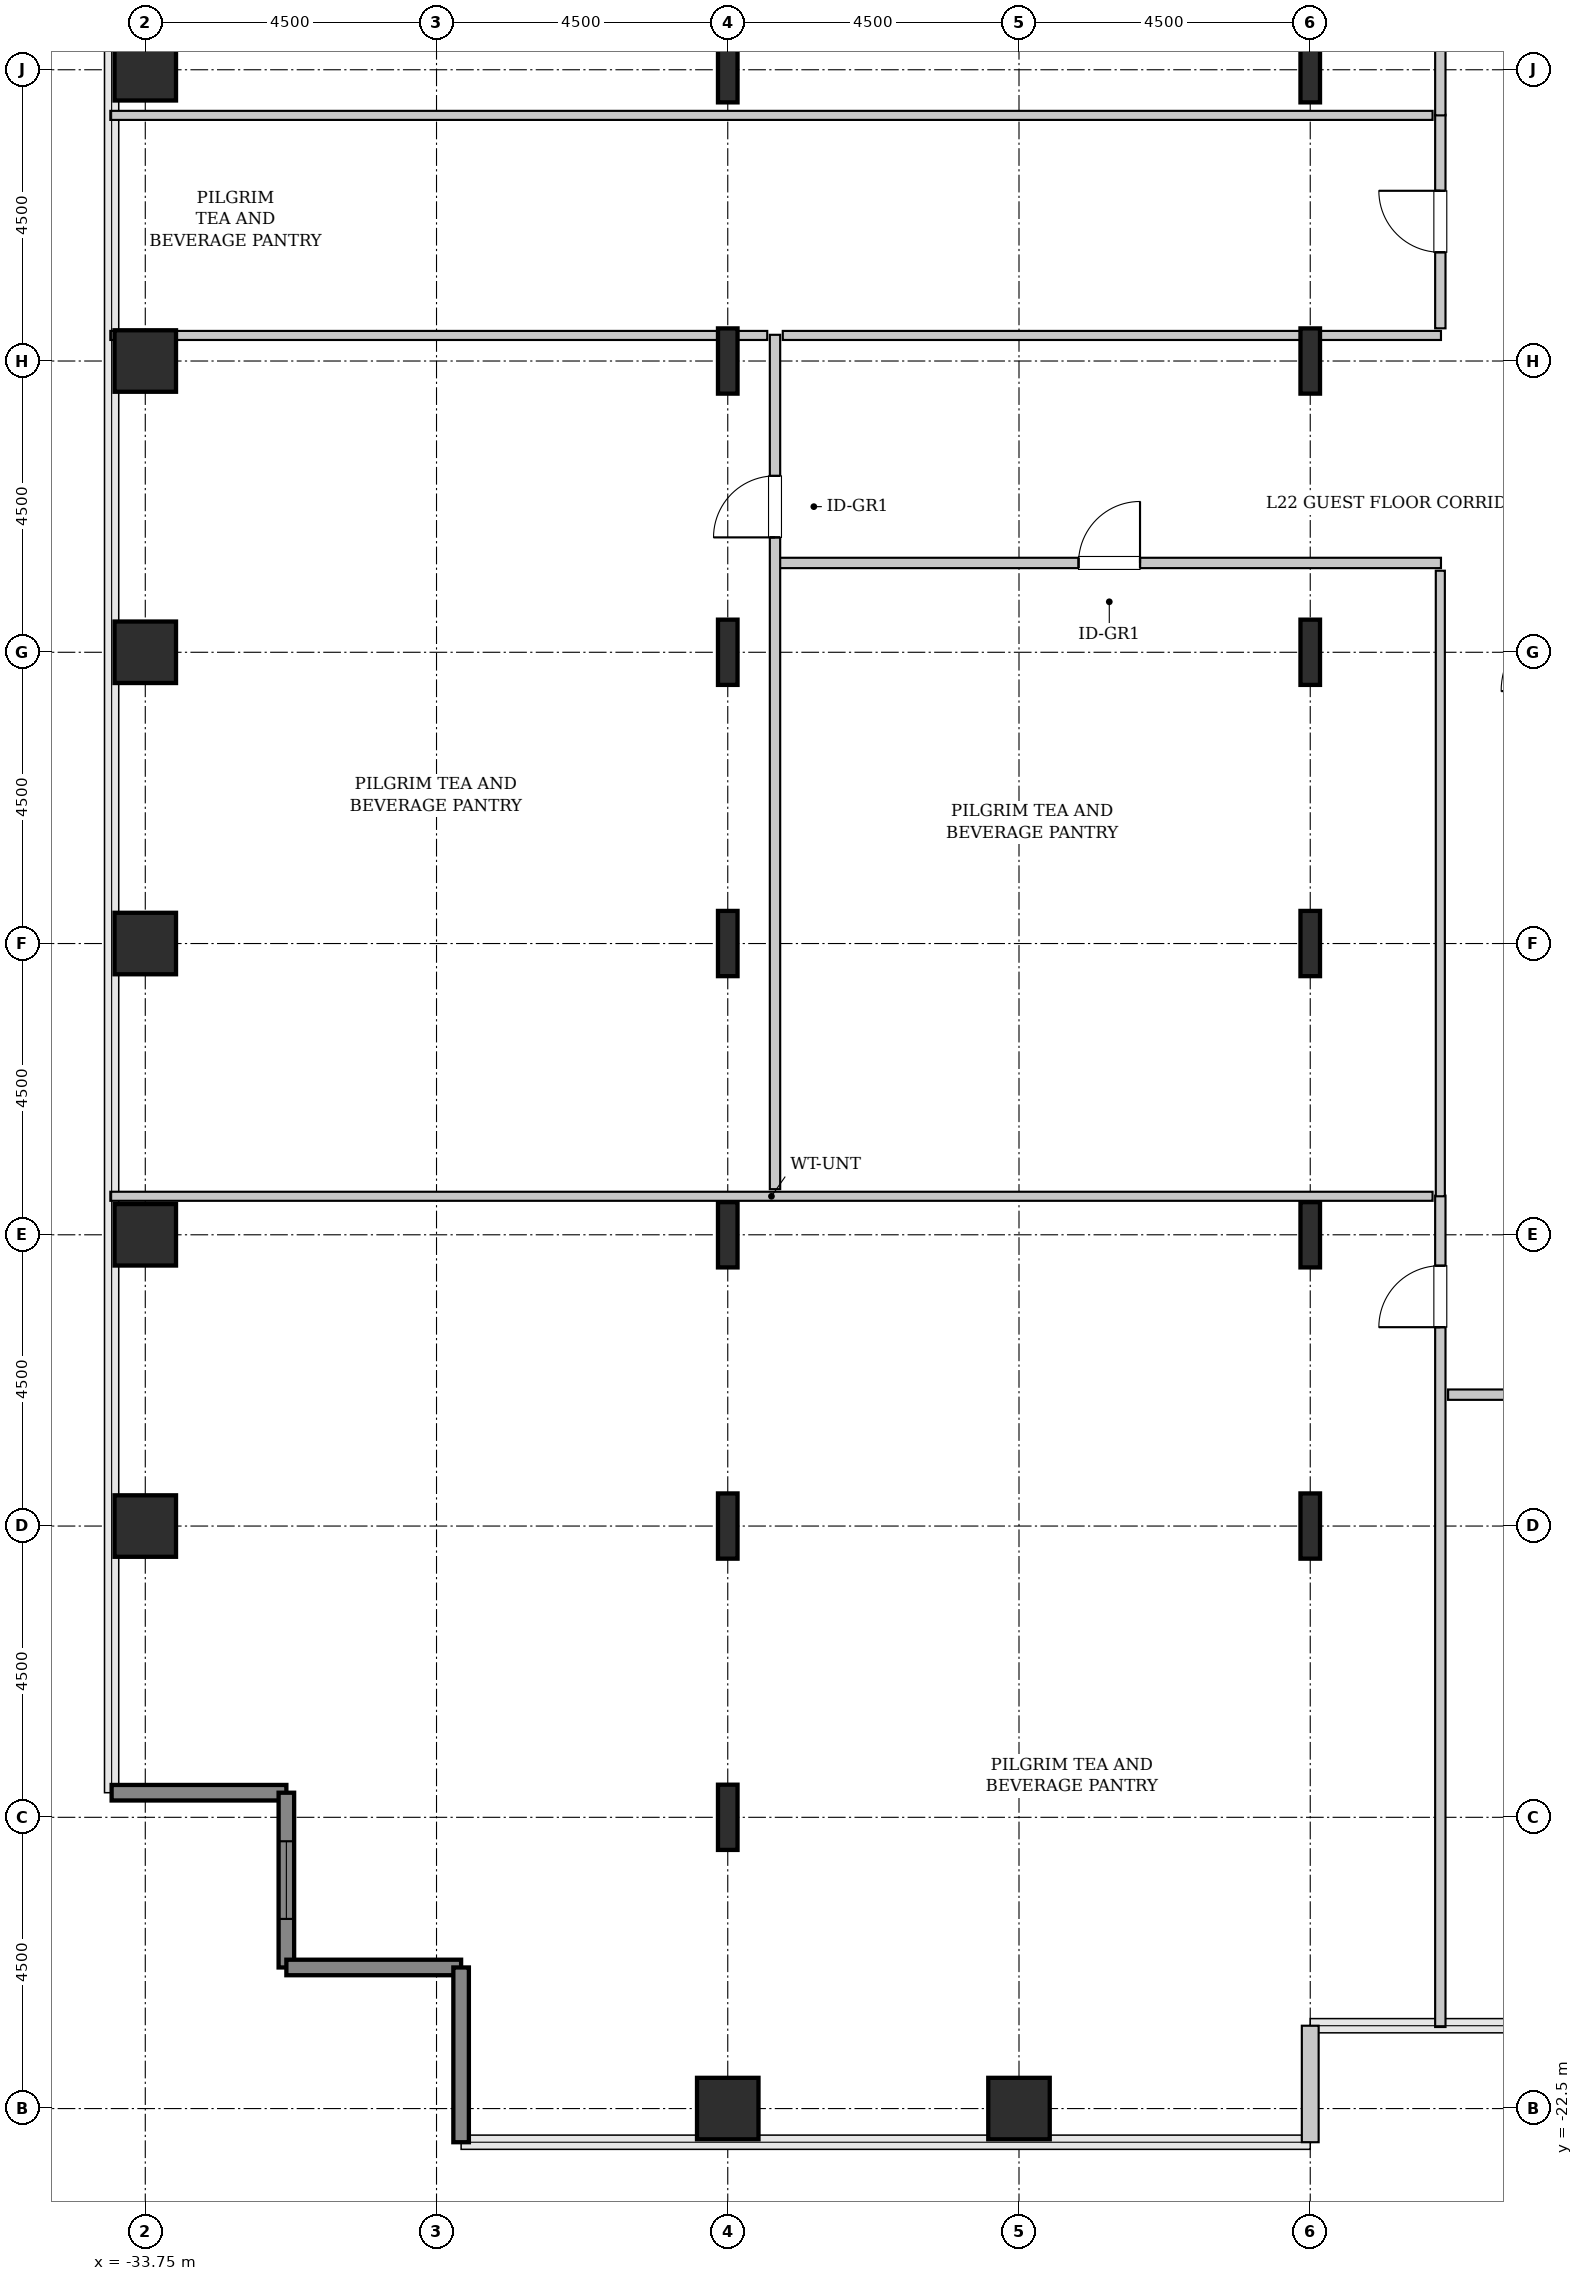
"""IFC4 building model, lengths in metres.
Left out: names, types, materials, properties, quantities, classifications, styles, units other than length and angle.
Written with IfcOpenShell. Run it as: python <this file> out.ifc"""

import sys

from ifc_helpers import new_model, si_unit, direction, frame, frame_2d, origin, origin_2d, place, context, subcontext, project, spatial, rectangle, hollow_rectangle, i_section, extrude, source, transform, mapped, element, fill, save


model = new_model("IFC4")
c1 = context("Model", 3, precision=1e-05, world=origin(), true_north=direction((0.0, 1.0)))
c2 = subcontext(c1, "Body", "Model", "MODEL_VIEW")
j1 = project(units=[si_unit("LENGTHUNIT", "METRE"), si_unit("PLANEANGLEUNIT", "RADIAN")], contexts=[c1])
p1 = place(None, origin())
s1 = spatial("IfcSite", under=j1, at=p1, CompositionType="ELEMENT")
p2 = place(p1, origin())
s2 = spatial("IfcBuilding", under=s1, at=p2, CompositionType="ELEMENT")
p3 = place(p2, frame((0.0, 0.0, 94.6)))
s3 = spatial("IfcBuildingStorey", under=s2, at=p3, CompositionType="ELEMENT", Elevation=94.6)
m1 = source(origin(), c2, "Body", "SweptSolid", [
    extrude(hollow_rectangle(XDim=0.95, YDim=0.95, WallThickness=0.045, InnerFilletRadius=0.045, OuterFilletRadius=0.09, at=origin_2d()), origin(), (0.0, 0.0, 1.0), 3.8),
])
for number, where, z_axis, x_axis in (
    (1, (-33.75, -13.5, 0.0), (0.0, 0.0, 1.0), (1.0, 0.0, 0.0)),
    (2, (-33.75, -9.0, 0.0), (0.0, 0.0, 1.0), (1.0, 0.0, 0.0)),
    (3, (-33.75, -4.5, 0.0), (0.0, 0.0, 1.0), (1.0, 0.0, 0.0)),
    (4, (-33.75, 0.0, 0.0), (0.0, 0.0, 1.0), (1.0, 0.0, 0.0)),
    (5, (-33.75, 4.5, 0.0), (0.0, 0.0, 1.0), (1.0, 0.0, 0.0)),
    (6, (-33.75, 9.0, 0.0), (0.0, 0.0, 1.0), (1.0, 0.0, 0.0)),
    (7, (-24.75, -22.5, 0.0), (0.0, 0.0, 1.0), (1.0, 0.0, 0.0)),
):
    element("IfcColumn", number, at=place(p3, frame(where, z_axis=z_axis, x_axis=x_axis)), inside=s3, PredefinedType="COLUMN", context=c2, shape_type="MappedRepresentation", body=[
        mapped(m1, transform((0.0, 0.0, 0.0), x_axis=(1.0, 0.0, 0.0), y_axis=(0.0, 1.0, 0.0), z_axis=(0.0, 0.0, 1.0), scale=1.0)),
    ])
m2 = source(origin(), c2, "Body", "SweptSolid", [
    extrude(i_section(OverallWidth=0.302, OverallDepth=1.008, WebThickness=0.021, FlangeThickness=0.04, FilletRadius=0.03, at=origin_2d()), origin(), (0.0, 0.0, 1.0), 3.8),
])
for number, where, z_axis, x_axis in (
    (8, (-24.75, -18.0, 0.0), (0.0, 0.0, 1.0), (1.0, 0.0, 0.0)),
    (9, (-24.75, -13.5, 0.0), (0.0, 0.0, 1.0), (1.0, 0.0, 0.0)),
    (10, (-24.75, -9.0, 0.0), (0.0, 0.0, 1.0), (1.0, 0.0, 0.0)),
    (11, (-24.75, -4.5, 0.0), (0.0, 0.0, 1.0), (1.0, 0.0, 0.0)),
    (12, (-24.75, 0.0, 0.0), (0.0, 0.0, 1.0), (1.0, 0.0, 0.0)),
    (13, (-24.75, 4.5, 0.0), (0.0, 0.0, 1.0), (1.0, 0.0, 0.0)),
    (14, (-24.75, 9.0, 0.0), (0.0, 0.0, 1.0), (1.0, 0.0, 0.0)),
):
    element("IfcColumn", number, at=place(p3, frame(where, z_axis=z_axis, x_axis=x_axis)), inside=s3, PredefinedType="COLUMN", context=c2, shape_type="MappedRepresentation", body=[
        mapped(m2, transform((0.0, 0.0, 0.0), x_axis=(1.0, 0.0, 0.0), y_axis=(0.0, 1.0, 0.0), z_axis=(0.0, 0.0, 1.0), scale=1.0)),
    ])
p4 = place(p3, frame((-20.25, -22.5, 0.0), z_axis=(0.0, 0.0, 1.0), x_axis=(1.0, 0.0, 0.0)))
e15 = element("IfcColumn", 15, at=p4, inside=s3, PredefinedType="COLUMN", context=c2, shape_type="MappedRepresentation", body=[
    mapped(m1, transform((0.0, 0.0, 0.0), x_axis=(1.0, 0.0, 0.0), y_axis=(0.0, 1.0, 0.0), z_axis=(0.0, 0.0, 1.0), scale=1.0)),
])
for number, where, z_axis, x_axis in (
    (16, (-15.75, -13.5, 0.0), (0.0, 0.0, 1.0), (1.0, 0.0, 0.0)),
    (17, (-15.75, -9.0, 0.0), (0.0, 0.0, 1.0), (1.0, 0.0, 0.0)),
    (18, (-15.75, -4.5, 0.0), (0.0, 0.0, 1.0), (1.0, 0.0, 0.0)),
    (19, (-15.75, 0.0, 0.0), (0.0, 0.0, 1.0), (1.0, 0.0, 0.0)),
    (20, (-15.75, 4.5, 0.0), (0.0, 0.0, 1.0), (1.0, 0.0, 0.0)),
    (21, (-15.75, 9.0, 0.0), (0.0, 0.0, 1.0), (1.0, 0.0, 0.0)),
):
    element("IfcColumn", number, at=place(p3, frame(where, z_axis=z_axis, x_axis=x_axis)), inside=s3, PredefinedType="COLUMN", context=c2, shape_type="MappedRepresentation", body=[
        mapped(m2, transform((0.0, 0.0, 0.0), x_axis=(1.0, 0.0, 0.0), y_axis=(0.0, 1.0, 0.0), z_axis=(0.0, 0.0, 1.0), scale=1.0)),
    ])
m3 = source(origin(), c2, "Body", "SweptSolid", [
    extrude(rectangle(XDim=2.7, YDim=0.24, at=frame_2d((1.35, 0.0))), origin(), (0.0, 0.0, 1.0), 3.55),
])
p5 = place(p3, frame((-34.27, -17.62, 0.0), z_axis=(0.0, 0.0, 1.0), x_axis=(1.0, 0.0, 0.0)))
e22 = element("IfcWall", 22, at=p5, inside=s3, PredefinedType="SHEAR", context=c2, shape_type="MappedRepresentation", body=[
    mapped(m3, transform((0.0, 0.0, 0.0), x_axis=(1.0, 0.0, 0.0), y_axis=(0.0, 1.0, 0.0), z_axis=(0.0, 0.0, 1.0), scale=1.0)),
])
p6 = place(p3, frame((-31.57, -17.62, 0.0), z_axis=(0.0, 0.0, 1.0), x_axis=(0.0, -1.0, 0.0)))
e23 = element("IfcWall", 23, at=p6, inside=s3, PredefinedType="SHEAR", context=c2, shape_type="MappedRepresentation", body=[
    mapped(m3, transform((0.0, 0.0, 0.0), x_axis=(1.0, 0.0, 0.0), y_axis=(0.0, 1.0, 0.0), z_axis=(0.0, 0.0, 1.0), scale=1.0)),
])
p7 = place(p6, frame((0.75, 0.0, 0.85)))
e24 = element("IfcOpeningElement", 24, at=p7, cuts=e23, PredefinedType="OPENING", context=c2, shape_type="SweptSolid", body=[
    extrude(rectangle(XDim=1.2, YDim=1.8, at=frame_2d((0.6, 0.9))), frame((0.0, 0.13, 0.0), z_axis=(0.0, -1.0, 0.0), x_axis=(1.0, 0.0, 0.0)), (0.0, 0.0, 1.0), 0.26),
])
for number, where, z_axis, x_axis in (
    (25, (-31.57, -20.32, 0.0), (0.0, 0.0, 1.0), (1.0, 0.0, 0.0)),
    (26, (-28.87, -20.32, 0.0), (0.0, 0.0, 1.0), (0.0, -1.0, 0.0)),
):
    element("IfcWall", number, at=place(p3, frame(where, z_axis=z_axis, x_axis=x_axis)), inside=s3, PredefinedType="SHEAR", context=c2, shape_type="MappedRepresentation", body=[
        mapped(m3, transform((0.0, 0.0, 0.0), x_axis=(1.0, 0.0, 0.0), y_axis=(0.0, 1.0, 0.0), z_axis=(0.0, 0.0, 1.0), scale=1.0)),
    ])
m4 = source(origin(), c2, "Body", "SweptSolid", [
    extrude(rectangle(XDim=1.8, YDim=0.26, at=frame_2d((0.9, 0.0))), origin(), (0.0, 0.0, 1.0), 3.55),
])
p8 = place(p3, frame((-15.75, -23.02, 0.0), z_axis=(0.0, 0.0, 1.0), x_axis=(0.0, 1.0, 0.0)))
e27 = element("IfcWall", 27, at=p8, inside=s3, PredefinedType="SOLIDWALL", context=c2, shape_type="MappedRepresentation", body=[
    mapped(m4, transform((0.0, 0.0, 0.0), x_axis=(1.0, 0.0, 0.0), y_axis=(0.0, 1.0, 0.0), z_axis=(0.0, 0.0, 1.0), scale=1.0)),
])
m5 = source(origin(), c2, "Body", "SweptSolid", [
    extrude(rectangle(XDim=12.845, YDim=0.16, at=frame_2d((6.422, 0.0))), origin(), (0.0, 0.0, 1.0), 3.535),
])
p9 = place(p3, frame((-13.74, -21.24, 0.0), z_axis=(0.0, 0.0, 1.0), x_axis=(0.0, 1.0, 0.0)))
e28 = element("IfcWall", 28, at=p9, inside=s3, PredefinedType="PARTITIONING", context=c2, shape_type="MappedRepresentation", body=[
    mapped(m5, transform((0.0, 0.0, 0.0), x_axis=(1.0, 0.0, 0.0), y_axis=(0.0, 1.0, 0.0), z_axis=(0.0, 0.0, 1.0), scale=1.0)),
])
p10 = place(p9, frame((10.812, 0.0, 0.0)))
e29 = element("IfcOpeningElement", 29, at=p10, cuts=e28, PredefinedType="OPENING", context=c2, shape_type="SweptSolid", body=[
    extrude(rectangle(XDim=0.95, YDim=2.1, at=frame_2d((0.475, 1.05))), frame((0.0, 0.09, 0.0), z_axis=(0.0, -1.0, 0.0), x_axis=(1.0, 0.0, 0.0)), (0.0, 0.0, 1.0), 0.18),
])
m6 = source(origin(), c2, "Body", "SweptSolid", [
    extrude(rectangle(XDim=20.43, YDim=0.14, at=frame_2d((10.215, 0.0))), origin(), (0.0, 0.0, 1.0), 3.535),
])
p11 = place(p3, frame((-34.29, -8.405, 0.0), z_axis=(0.0, 0.0, 1.0), x_axis=(1.0, 0.0, 0.0)))
e30 = element("IfcWall", 30, at=p11, inside=s3, PredefinedType="PARTITIONING", context=c2, shape_type="MappedRepresentation", body=[
    mapped(m6, transform((0.0, 0.0, 0.0), x_axis=(1.0, 0.0, 0.0), y_axis=(0.0, 1.0, 0.0), z_axis=(0.0, 0.0, 1.0), scale=1.0)),
])
m7 = source(origin(), c2, "Body", "SweptSolid", [
    extrude(rectangle(XDim=10.25, YDim=0.16, at=frame_2d((5.125, 0.0))), origin(), (0.0, 0.0, 1.0), 3.535),
])
p12 = place(p3, frame((-23.98, 1.38, 0.0), z_axis=(0.0, 0.0, 1.0), x_axis=(1.0, 0.0, 0.0)))
e31 = element("IfcWall", 31, at=p12, inside=s3, PredefinedType="PARTITIONING", context=c2, shape_type="MappedRepresentation", body=[
    mapped(m7, transform((0.0, 0.0, 0.0), x_axis=(1.0, 0.0, 0.0), y_axis=(0.0, 1.0, 0.0), z_axis=(0.0, 0.0, 1.0), scale=1.0)),
])
p13 = place(p12, frame((4.65, 0.0, 0.0)))
e32 = element("IfcOpeningElement", 32, at=p13, cuts=e31, PredefinedType="OPENING", context=c2, shape_type="SweptSolid", body=[
    extrude(rectangle(XDim=0.95, YDim=2.1, at=frame_2d((0.475, 1.05))), frame((0.0, 0.09, 0.0), z_axis=(0.0, -1.0, 0.0), x_axis=(1.0, 0.0, 0.0)), (0.0, 0.0, 1.0), 0.18),
])
m8 = source(origin(), c2, "Body", "SweptSolid", [
    extrude(rectangle(XDim=9.665, YDim=0.14, at=frame_2d((4.833, 0.0))), origin(), (0.0, 0.0, 1.0), 3.535),
])
p14 = place(p3, frame((-13.74, -8.405, 0.0), z_axis=(0.0, 0.0, 1.0), x_axis=(0.0, 1.0, 0.0)))
e33 = element("IfcWall", 33, at=p14, inside=s3, PredefinedType="PARTITIONING", context=c2, shape_type="MappedRepresentation", body=[
    mapped(m8, transform((0.0, 0.0, 0.0), x_axis=(1.0, 0.0, 0.0), y_axis=(0.0, 1.0, 0.0), z_axis=(0.0, 0.0, 1.0), scale=1.0)),
])
m9 = source(origin(), c2, "Body", "SweptSolid", [
    extrude(rectangle(XDim=13.2, YDim=0.16, at=frame_2d((6.6, 0.0))), origin(), (0.0, 0.0, 1.0), 3.535),
])
p15 = place(p3, frame((-24.02, -8.295, 0.0), z_axis=(0.0, 0.0, 1.0), x_axis=(0.0, 1.0, 0.0)))
e34 = element("IfcWall", 34, at=p15, inside=s3, PredefinedType="PARTITIONING", context=c2, shape_type="MappedRepresentation", body=[
    mapped(m9, transform((0.0, 0.0, 0.0), x_axis=(1.0, 0.0, 0.0), y_axis=(0.0, 1.0, 0.0), z_axis=(0.0, 0.0, 1.0), scale=1.0)),
])
p16 = place(p15, frame((10.07, 0.0, 0.0)))
e35 = element("IfcOpeningElement", 35, at=p16, cuts=e34, PredefinedType="OPENING", context=c2, shape_type="SweptSolid", body=[
    extrude(rectangle(XDim=0.95, YDim=2.1, at=frame_2d((0.475, 1.05))), frame((0.0, 0.09, 0.0), z_axis=(0.0, -1.0, 0.0), x_axis=(1.0, 0.0, 0.0)), (0.0, 0.0, 1.0), 0.18),
])
m10 = source(origin(), c2, "Body", "SweptSolid", [
    extrude(rectangle(XDim=10.15, YDim=0.14, at=frame_2d((5.075, 0.0))), origin(), (0.0, 0.0, 1.0), 2.825),
])
p17 = place(p3, frame((-34.29, 4.895, 0.0), z_axis=(0.0, 0.0, 1.0), x_axis=(1.0, 0.0, 0.0)))
e36 = element("IfcWall", 36, at=p17, inside=s3, PredefinedType="PARTITIONING", context=c2, shape_type="MappedRepresentation", body=[
    mapped(m10, transform((0.0, 0.0, 0.0), x_axis=(1.0, 0.0, 0.0), y_axis=(0.0, 1.0, 0.0), z_axis=(0.0, 0.0, 1.0), scale=1.0)),
])
m11 = source(origin(), c2, "Body", "SweptSolid", [
    extrude(rectangle(XDim=10.17, YDim=0.14, at=frame_2d((5.085, 0.0))), origin(), (0.0, 0.0, 1.0), 2.825),
])
p18 = place(p3, frame((-23.9, 4.895, 0.0), z_axis=(0.0, 0.0, 1.0), x_axis=(1.0, 0.0, 0.0)))
e37 = element("IfcWall", 37, at=p18, inside=s3, PredefinedType="PARTITIONING", context=c2, shape_type="MappedRepresentation", body=[
    mapped(m11, transform((0.0, 0.0, 0.0), x_axis=(1.0, 0.0, 0.0), y_axis=(0.0, 1.0, 0.0), z_axis=(0.0, 0.0, 1.0), scale=1.0)),
])
m12 = source(origin(), c2, "Body", "SweptSolid", [
    extrude(rectangle(XDim=3.3, YDim=0.16, at=frame_2d((1.65, 0.0))), origin(), (0.0, 0.0, 1.0), 3.535),
])
p19 = place(p3, frame((-13.74, 5.005, 0.0), z_axis=(0.0, 0.0, 1.0), x_axis=(0.0, 1.0, 0.0)))
e38 = element("IfcWall", 38, at=p19, inside=s3, PredefinedType="PARTITIONING", context=c2, shape_type="MappedRepresentation", body=[
    mapped(m12, transform((0.0, 0.0, 0.0), x_axis=(1.0, 0.0, 0.0), y_axis=(0.0, 1.0, 0.0), z_axis=(0.0, 0.0, 1.0), scale=1.0)),
])
p20 = place(p19, frame((1.175, 0.0, 0.0)))
e39 = element("IfcOpeningElement", 39, at=p20, cuts=e38, PredefinedType="OPENING", context=c2, shape_type="SweptSolid", body=[
    extrude(rectangle(XDim=0.95, YDim=2.1, at=frame_2d((0.475, 1.05))), frame((0.0, 0.09, 0.0), z_axis=(0.0, -1.0, 0.0), x_axis=(1.0, 0.0, 0.0)), (0.0, 0.0, 1.0), 0.18),
])
p21 = place(p3, frame((-34.29, 8.295, 0.0), z_axis=(0.0, 0.0, 1.0), x_axis=(1.0, 0.0, 0.0)))
e40 = element("IfcWall", 40, at=p21, inside=s3, PredefinedType="PARTITIONING", context=c2, shape_type="MappedRepresentation", body=[
    mapped(m6, transform((0.0, 0.0, 0.0), x_axis=(1.0, 0.0, 0.0), y_axis=(0.0, 1.0, 0.0), z_axis=(0.0, 0.0, 1.0), scale=1.0)),
])
m13 = source(origin(), c2, "Body", "SweptSolid", [
    extrude(rectangle(XDim=12.945, YDim=0.16, at=frame_2d((6.473, 0.0))), origin(), (0.0, 0.0, 1.0), 3.535),
])
p22 = place(p3, frame((-13.74, 8.295, 0.0), z_axis=(0.0, 0.0, 1.0), x_axis=(0.0, 1.0, 0.0)))
e41 = element("IfcWall", 41, at=p22, inside=s3, PredefinedType="PARTITIONING", context=c2, shape_type="MappedRepresentation", body=[
    mapped(m13, transform((0.0, 0.0, 0.0), x_axis=(1.0, 0.0, 0.0), y_axis=(0.0, 1.0, 0.0), z_axis=(0.0, 0.0, 1.0), scale=1.0)),
])
p23 = place(p22, frame((1.133, 0.0, 0.0)))
e42 = element("IfcOpeningElement", 42, at=p23, cuts=e41, PredefinedType="OPENING", context=c2, shape_type="SweptSolid", body=[
    extrude(rectangle(XDim=0.95, YDim=2.1, at=frame_2d((0.475, 1.05))), frame((0.0, 0.09, 0.0), z_axis=(0.0, -1.0, 0.0), x_axis=(1.0, 0.0, 0.0)), (0.0, 0.0, 1.0), 0.18),
])
m14 = source(origin(), c2, "Body", "SweptSolid", [
    extrude(rectangle(XDim=5.425, YDim=0.16, at=frame_2d((2.712, 0.0))), origin(), (0.0, 0.0, 1.0), 3.535),
])
p24 = place(p3, frame((-13.62, -11.47, 0.0), z_axis=(0.0, 0.0, 1.0), x_axis=(1.0, 0.0, 0.0)))
e43 = element("IfcWall", 43, at=p24, inside=s3, PredefinedType="PARTITIONING", context=c2, shape_type="MappedRepresentation", body=[
    mapped(m14, transform((0.0, 0.0, 0.0), x_axis=(1.0, 0.0, 0.0), y_axis=(0.0, 1.0, 0.0), z_axis=(0.0, 0.0, 1.0), scale=1.0)),
])
p25 = place(p24, frame((2.238, 0.0, 0.0)))
e44 = element("IfcOpeningElement", 44, at=p25, cuts=e43, PredefinedType="OPENING", context=c2, shape_type="SweptSolid", body=[
    extrude(rectangle(XDim=0.95, YDim=2.1, at=frame_2d((0.475, 1.05))), frame((0.0, 0.09, 0.0), z_axis=(0.0, -1.0, 0.0), x_axis=(1.0, 0.0, 0.0)), (0.0, 0.0, 1.0), 0.18),
])
m15 = source(origin(), c2, "Body", "SweptSolid", [
    extrude(rectangle(XDim=1.2, YDim=1.8, at=frame_2d((0.6, 0.9))), frame((0.0, 0.03, 0.0), z_axis=(0.0, -1.0, 0.0), x_axis=(1.0, 0.0, 0.0)), (0.0, 0.0, 1.0), 0.06),
])
p26 = place(p7, origin())
e45 = element("IfcWindow", 45, at=p26, inside=s3, PartitioningType="SINGLE_PANEL", PredefinedType="WINDOW", context=c2, shape_type="MappedRepresentation", body=[
    mapped(m15, transform((0.0, 0.0, 0.0), x_axis=(1.0, 0.0, 0.0), y_axis=(0.0, 1.0, 0.0), z_axis=(0.0, 0.0, 1.0), scale=1.0)),
])
fill(e24, e45)
m16 = source(origin(), c2, "Body", "SweptSolid", [
    extrude(rectangle(XDim=0.95, YDim=2.1, at=frame_2d((0.475, 1.05))), frame((0.0, 0.025, 0.0), z_axis=(0.0, -1.0, 0.0), x_axis=(1.0, 0.0, 0.0)), (0.0, 0.0, 1.0), 0.05),
])
p27 = place(p10, origin())
e46 = element("IfcDoor", 46, at=p27, inside=s3, OperationType="SINGLE_SWING_LEFT", PredefinedType="DOOR", context=c2, shape_type="MappedRepresentation", body=[
    mapped(m16, transform((0.0, 0.0, 0.0), x_axis=(1.0, 0.0, 0.0), y_axis=(0.0, 1.0, 0.0), z_axis=(0.0, 0.0, 1.0), scale=1.0)),
])
fill(e29, e46)
p28 = place(p13, origin())
e47 = element("IfcDoor", 47, at=p28, inside=s3, OperationType="SINGLE_SWING_RIGHT", PredefinedType="DOOR", context=c2, shape_type="MappedRepresentation", body=[
    mapped(m16, transform((0.0, 0.0, 0.0), x_axis=(1.0, 0.0, 0.0), y_axis=(0.0, 1.0, 0.0), z_axis=(0.0, 0.0, 1.0), scale=1.0)),
])
fill(e32, e47)
p29 = place(p16, origin())
e48 = element("IfcDoor", 48, at=p29, inside=s3, OperationType="SINGLE_SWING_LEFT", PredefinedType="DOOR", context=c2, shape_type="MappedRepresentation", body=[
    mapped(m16, transform((0.0, 0.0, 0.0), x_axis=(1.0, 0.0, 0.0), y_axis=(0.0, 1.0, 0.0), z_axis=(0.0, 0.0, 1.0), scale=1.0)),
])
fill(e35, e48)
p30 = place(p20, origin())
e49 = element("IfcDoor", 49, at=p30, inside=s3, OperationType="SINGLE_SWING_RIGHT", PredefinedType="DOOR", context=c2, shape_type="MappedRepresentation", body=[
    mapped(m16, transform((0.0, 0.0, 0.0), x_axis=(1.0, 0.0, 0.0), y_axis=(0.0, 1.0, 0.0), z_axis=(0.0, 0.0, 1.0), scale=1.0)),
])
fill(e39, e49)
save(model, sys.argv[1])
